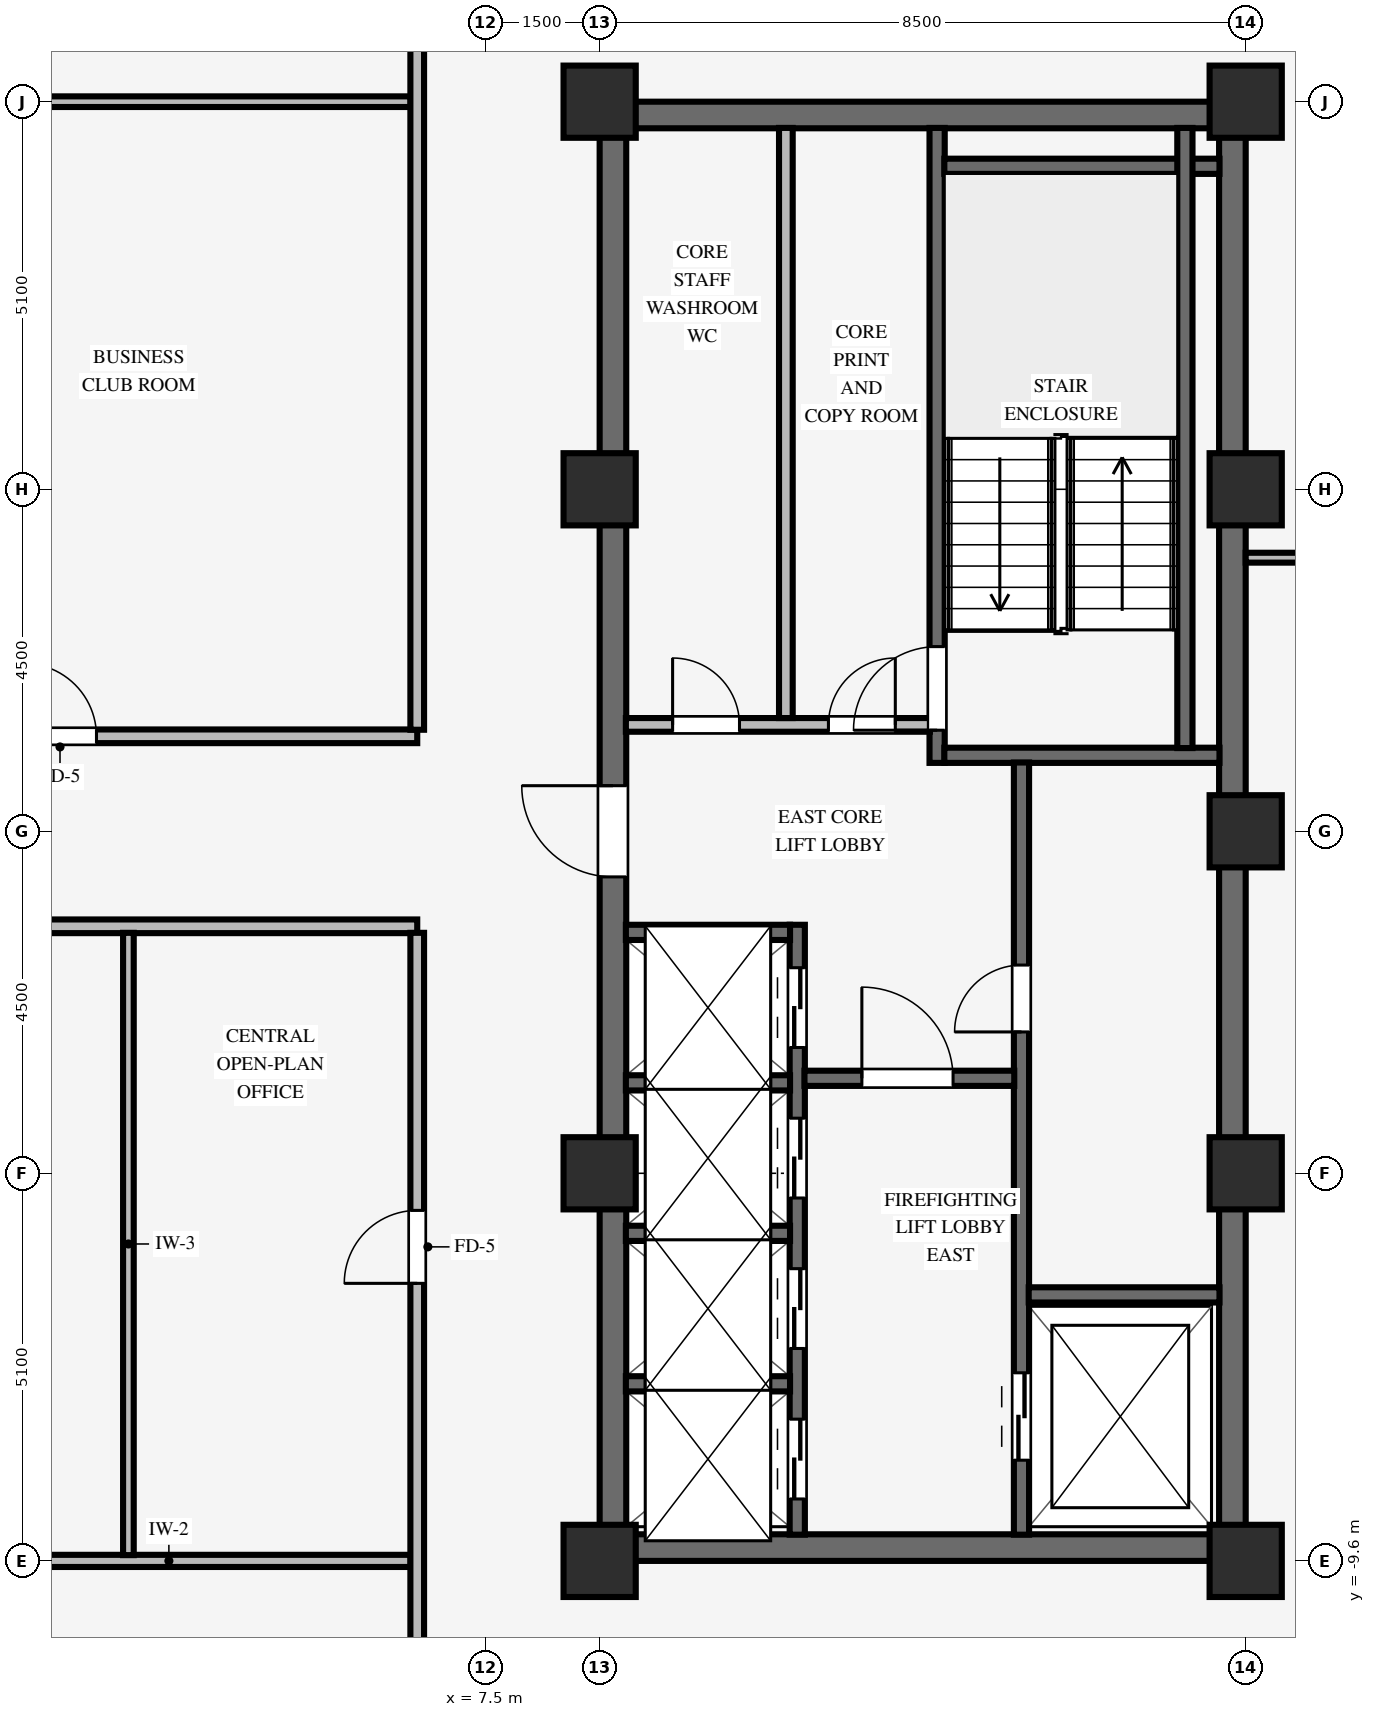
"""IFC4 building model, lengths in metres.
Left out: names, types, materials, properties, quantities, classifications, styles, units other than length and angle.
Written with IfcOpenShell. Run it as: python <this file> out.ifc"""

import sys

from ifc_helpers import new_model, si_unit, direction, frame, frame_2d, origin, origin_2d, place, context, subcontext, project, spatial, rectangle, extrude, source, transform, mapped, element, fill, save


model = new_model("IFC4")
c1 = context("Model", 3, precision=1e-05, world=origin(), true_north=direction((0.0, 1.0)))
c2 = subcontext(c1, "Body", "Model", "MODEL_VIEW")
j1 = project(units=[si_unit("LENGTHUNIT", "METRE"), si_unit("PLANEANGLEUNIT", "RADIAN")], contexts=[c1])
p1 = place(None, origin())
s1 = spatial("IfcSite", under=j1, at=p1, CompositionType="ELEMENT")
p2 = place(p1, origin())
s2 = spatial("IfcBuilding", under=s1, at=p2, CompositionType="ELEMENT")
p3 = place(p2, frame((0.0, 0.0, 198.2)))
s3 = spatial("IfcBuildingStorey", under=s2, at=p3, CompositionType="ELEMENT", Elevation=198.2)
for number, where, z_axis, x_axis in (
    (1, (9.0, -9.425, 0.0), (0.0, 0.0, 1.0), (1.0, 0.0, 0.0)),
    (2, (9.0, 9.425, 0.0), (0.0, 0.0, 1.0), (1.0, 0.0, 0.0)),
):
    element("IfcWall", number, at=place(p3, frame(where, z_axis=z_axis, x_axis=x_axis)), inside=s3, PredefinedType="SHEAR", context=c2, shape_type="SweptSolid", body=[
        extrude(rectangle(XDim=8.5, YDim=0.35, at=frame_2d((4.25, 0.0))), origin(), (0.0, 0.0, 1.0), 3.37),
    ])
p4 = place(p3, frame((9.175, -9.255, 0.0), z_axis=(0.0, 0.0, 1.0), x_axis=(0.0, 1.0, 0.0)))
e3 = element("IfcWall", 3, at=p4, inside=s3, PredefinedType="SHEAR", context=c2, shape_type="SweptSolid", body=[
    extrude(rectangle(XDim=18.51, YDim=0.35, at=frame_2d((9.255, 0.0))), origin(), (0.0, 0.0, 1.0), 3.37),
])
p5 = place(p4, frame((8.655, 0.0, 0.0)))
e4 = element("IfcOpeningElement", 4, at=p5, cuts=e3, PredefinedType="OPENING", context=c2, shape_type="SweptSolid", body=[
    extrude(rectangle(XDim=1.2, YDim=2.15, at=frame_2d((0.6, 1.075))), frame((0.0, 0.185, 0.0), z_axis=(0.0, -1.0, 0.0), x_axis=(1.0, 0.0, 0.0)), (0.0, 0.0, 1.0), 0.37),
])
p6 = place(p3, frame((17.325, -9.255, 0.0), z_axis=(0.0, 0.0, 1.0), x_axis=(0.0, 1.0, 0.0)))
e5 = element("IfcWall", 5, at=p6, inside=s3, PredefinedType="SHEAR", context=c2, shape_type="SweptSolid", body=[
    extrude(rectangle(XDim=18.51, YDim=0.35, at=frame_2d((9.255, 0.0))), origin(), (0.0, 0.0, 1.0), 3.37),
])
for number, where, z_axis, x_axis in (
    (6, (9.0, -9.6, 0.0), (0.0, 0.0, 1.0), (1.0, 0.0, 0.0)),
    (7, (9.0, -4.5, 0.0), (0.0, 0.0, 1.0), (1.0, 0.0, 0.0)),
    (8, (9.0, 4.5, 0.0), (0.0, 0.0, 1.0), (1.0, 0.0, 0.0)),
    (9, (9.0, 9.6, 0.0), (0.0, 0.0, 1.0), (1.0, 0.0, 0.0)),
    (10, (17.5, -9.6, 0.0), (0.0, 0.0, 1.0), (1.0, 0.0, 0.0)),
    (11, (17.5, -4.5, 0.0), (0.0, 0.0, 1.0), (1.0, 0.0, 0.0)),
    (12, (17.5, 4.5, 0.0), (0.0, 0.0, 1.0), (1.0, 0.0, 0.0)),
    (13, (17.5, 9.6, 0.0), (0.0, 0.0, 1.0), (1.0, 0.0, 0.0)),
    (14, (17.5, 0.0, 0.0), (0.0, 0.0, 1.0), (1.0, 0.0, 0.0)),
):
    element("IfcColumn", number, at=place(p3, frame(where, z_axis=z_axis, x_axis=x_axis)), inside=s3, PredefinedType="COLUMN", context=c2, shape_type="SweptSolid", body=[
        extrude(rectangle(XDim=0.95, YDim=0.95, at=origin_2d()), origin(), (0.0, 0.0, 1.0), 3.37),
    ])
p7 = place(p3, frame((13.44, 0.9, 0.0), z_axis=(0.0, 0.0, 1.0), x_axis=(0.0, 1.0, 0.0)))
e15 = element("IfcWall", 15, at=p7, inside=s3, PredefinedType="SHEAR", context=c2, shape_type="SweptSolid", body=[
    extrude(rectangle(XDim=8.355, YDim=0.2, at=frame_2d((4.177, 0.0))), origin(), (0.0, 0.0, 1.0), 3.37),
])
p8 = place(p7, frame((0.43, 0.0, 0.0)))
e16 = element("IfcOpeningElement", 16, at=p8, cuts=e15, PredefinedType="OPENING", context=c2, shape_type="SweptSolid", body=[
    extrude(rectangle(XDim=1.1, YDim=2.15, at=frame_2d((0.55, 1.075))), frame((0.0, 0.11, 0.0), z_axis=(0.0, -1.0, 0.0), x_axis=(1.0, 0.0, 0.0)), (0.0, 0.0, 1.0), 0.22),
])
for number, where, z_axis, x_axis in (
    (17, (13.535, 1.0, 0.0), (0.0, 0.0, 1.0), (1.0, 0.0, 0.0)),
    (18, (13.535, 8.75, 0.0), (0.0, 0.0, 1.0), (1.0, 0.0, 0.0)),
):
    element("IfcWall", number, at=place(p3, frame(where, z_axis=z_axis, x_axis=x_axis)), inside=s3, PredefinedType="SHEAR", context=c2, shape_type="SweptSolid", body=[
        extrude(rectangle(XDim=3.62, YDim=0.2, at=frame_2d((1.81, 0.0))), origin(), (0.0, 0.0, 1.0), 3.37),
    ])
p9 = place(p3, frame((16.7, 1.095, 0.0), z_axis=(0.0, 0.0, 1.0), x_axis=(0.0, 1.0, 0.0)))
e19 = element("IfcWall", 19, at=p9, inside=s3, PredefinedType="SHEAR", context=c2, shape_type="SweptSolid", body=[
    extrude(rectangle(XDim=8.16, YDim=0.2, at=frame_2d((4.08, 0.0))), origin(), (0.0, 0.0, 1.0), 3.37),
])
p10 = place(p3, frame((14.55, -9.255, 0.0), z_axis=(0.0, 0.0, 1.0), x_axis=(0.0, 1.0, 0.0)))
e20 = element("IfcWall", 20, at=p10, inside=s3, PredefinedType="SHEAR", context=c2, shape_type="SweptSolid", body=[
    extrude(rectangle(XDim=10.16, YDim=0.2, at=frame_2d((5.08, 0.0))), origin(), (0.0, 0.0, 1.0), 3.37),
])
p11 = place(p10, frame((6.615, 0.0, 0.0)))
e21 = element("IfcOpeningElement", 21, at=p11, cuts=e20, PredefinedType="OPENING", context=c2, shape_type="SweptSolid", body=[
    extrude(rectangle(XDim=0.88, YDim=2.1, at=frame_2d((0.44, 1.05))), frame((0.0, 0.11, 0.0), z_axis=(0.0, -1.0, 0.0), x_axis=(1.0, 0.0, 0.0)), (0.0, 0.0, 1.0), 0.22),
])
p12 = place(p10, frame((0.98, 0.0, 0.0)))
e22 = element("IfcOpeningElement", 22, at=p12, cuts=e20, PredefinedType="OPENING", context=c2, shape_type="SweptSolid", body=[
    extrude(rectangle(XDim=1.15, YDim=2.15, at=frame_2d((0.575, 1.075))), frame((0.0, 0.11, 0.0), z_axis=(0.0, -1.0, 0.0), x_axis=(1.0, 0.0, 0.0)), (0.0, 0.0, 1.0), 0.22),
])
p13 = place(p3, frame((14.645, -6.1, 0.0), z_axis=(0.0, 0.0, 1.0), x_axis=(1.0, 0.0, 0.0)))
e23 = element("IfcWall", 23, at=p13, inside=s3, PredefinedType="SHEAR", context=c2, shape_type="SweptSolid", body=[
    extrude(rectangle(XDim=2.51, YDim=0.2, at=frame_2d((1.255, 0.0))), origin(), (0.0, 0.0, 1.0), 3.37),
])
p14 = place(p3, frame((11.6, -9.255, 0.0), z_axis=(0.0, 0.0, 1.0), x_axis=(0.0, 1.0, 0.0)))
e24 = element("IfcWall", 24, at=p14, inside=s3, PredefinedType="SHEAR", context=c2, shape_type="SweptSolid", body=[
    extrude(rectangle(XDim=8.025, YDim=0.2, at=frame_2d((4.012, 0.0))), origin(), (0.0, 0.0, 1.0), 3.37),
])
p15 = place(p14, frame((0.47, 0.0, 0.0)))
e25 = element("IfcOpeningElement", 25, at=p15, cuts=e24, PredefinedType="OPENING", context=c2, shape_type="SweptSolid", body=[
    extrude(rectangle(XDim=1.05, YDim=2.15, at=frame_2d((0.525, 1.075))), frame((0.0, 0.11, 0.0), z_axis=(0.0, -1.0, 0.0), x_axis=(1.0, 0.0, 0.0)), (0.0, 0.0, 1.0), 0.22),
])
p16 = place(p14, frame((2.45, 0.0, 0.0)))
e26 = element("IfcOpeningElement", 26, at=p16, cuts=e24, PredefinedType="OPENING", context=c2, shape_type="SweptSolid", body=[
    extrude(rectangle(XDim=1.05, YDim=2.15, at=frame_2d((0.525, 1.075))), frame((0.0, 0.11, 0.0), z_axis=(0.0, -1.0, 0.0), x_axis=(1.0, 0.0, 0.0)), (0.0, 0.0, 1.0), 0.22),
])
p17 = place(p14, frame((4.43, 0.0, 0.0)))
e27 = element("IfcOpeningElement", 27, at=p17, cuts=e24, PredefinedType="OPENING", context=c2, shape_type="SweptSolid", body=[
    extrude(rectangle(XDim=1.05, YDim=2.15, at=frame_2d((0.525, 1.075))), frame((0.0, 0.11, 0.0), z_axis=(0.0, -1.0, 0.0), x_axis=(1.0, 0.0, 0.0)), (0.0, 0.0, 1.0), 0.22),
])
p18 = place(p14, frame((6.41, 0.0, 0.0)))
e28 = element("IfcOpeningElement", 28, at=p18, cuts=e24, PredefinedType="OPENING", context=c2, shape_type="SweptSolid", body=[
    extrude(rectangle(XDim=1.05, YDim=2.15, at=frame_2d((0.525, 1.075))), frame((0.0, 0.11, 0.0), z_axis=(0.0, -1.0, 0.0), x_axis=(1.0, 0.0, 0.0)), (0.0, 0.0, 1.0), 0.22),
])
p19 = place(p3, frame((11.695, -3.25, 0.0), z_axis=(0.0, 0.0, 1.0), x_axis=(1.0, 0.0, 0.0)))
e29 = element("IfcWall", 29, at=p19, inside=s3, PredefinedType="SHEAR", context=c2, shape_type="SweptSolid", body=[
    extrude(rectangle(XDim=2.76, YDim=0.2, at=frame_2d((1.38, 0.0))), origin(), (0.0, 0.0, 1.0), 3.37),
])
p20 = place(p19, frame((0.755, 0.0, 0.0)))
e30 = element("IfcOpeningElement", 30, at=p20, cuts=e29, PredefinedType="OPENING", context=c2, shape_type="SweptSolid", body=[
    extrude(rectangle(XDim=1.2, YDim=2.15, at=frame_2d((0.6, 1.075))), frame((0.0, 0.11, 0.0), z_axis=(0.0, -1.0, 0.0), x_axis=(1.0, 0.0, 0.0)), (0.0, 0.0, 1.0), 0.22),
])
for number, where, z_axis, x_axis in (
    (31, (9.345, -7.27, 0.0), (0.0, 0.0, 1.0), (1.0, 0.0, 0.0)),
    (32, (9.345, -5.29, 0.0), (0.0, 0.0, 1.0), (1.0, 0.0, 0.0)),
    (33, (9.345, -3.31, 0.0), (0.0, 0.0, 1.0), (1.0, 0.0, 0.0)),
    (34, (9.345, -1.33, 0.0), (0.0, 0.0, 1.0), (1.0, 0.0, 0.0)),
):
    element("IfcWall", number, at=place(p3, frame(where, z_axis=z_axis, x_axis=x_axis)), inside=s3, PredefinedType="SHEAR", context=c2, shape_type="SweptSolid", body=[
        extrude(rectangle(XDim=2.16, YDim=0.2, at=frame_2d((1.08, 0.0))), origin(), (0.0, 0.0, 1.0), 3.37),
    ])
p21 = place(p3, frame((9.345, 1.4, 0.0), z_axis=(0.0, 0.0, 1.0), x_axis=(1.0, 0.0, 0.0)))
e35 = element("IfcWall", 35, at=p21, inside=s3, PredefinedType="PARTITIONING", context=c2, shape_type="SweptSolid", body=[
    extrude(rectangle(XDim=4.0, YDim=0.18, at=frame_2d((2.0, 0.0))), origin(), (0.0, 0.0, 1.0), 3.36),
])
p22 = place(p21, frame((0.615, 0.0, 0.0)))
e36 = element("IfcOpeningElement", 36, at=p22, cuts=e35, PredefinedType="OPENING", context=c2, shape_type="SweptSolid", body=[
    extrude(rectangle(XDim=0.88, YDim=2.1, at=frame_2d((0.44, 1.05))), frame((0.0, 0.1, 0.0), z_axis=(0.0, -1.0, 0.0), x_axis=(1.0, 0.0, 0.0)), (0.0, 0.0, 1.0), 0.2),
])
p23 = place(p21, frame((2.665, 0.0, 0.0)))
e37 = element("IfcOpeningElement", 37, at=p23, cuts=e35, PredefinedType="OPENING", context=c2, shape_type="SweptSolid", body=[
    extrude(rectangle(XDim=0.88, YDim=2.1, at=frame_2d((0.44, 1.05))), frame((0.0, 0.1, 0.0), z_axis=(0.0, -1.0, 0.0), x_axis=(1.0, 0.0, 0.0)), (0.0, 0.0, 1.0), 0.2),
])
p24 = place(p3, frame((11.45, 1.49, 0.0), z_axis=(0.0, 0.0, 1.0), x_axis=(0.0, 1.0, 0.0)))
e38 = element("IfcWall", 38, at=p24, inside=s3, PredefinedType="PARTITIONING", context=c2, shape_type="SweptSolid", body=[
    extrude(rectangle(XDim=7.765, YDim=0.18, at=frame_2d((3.882, 0.0))), origin(), (0.0, 0.0, 1.0), 3.36),
])
p25 = place(p3, frame((0.151, -9.6, 0.0), z_axis=(0.0, 0.0, 1.0), x_axis=(1.0, 0.0, 0.0)))
e39 = element("IfcWall", 39, at=p25, inside=s3, PredefinedType="PARTITIONING", context=c2, shape_type="SweptSolid", body=[
    extrude(rectangle(XDim=6.363, YDim=0.16, at=frame_2d((3.182, 0.0))), origin(), (0.0, 0.0, 1.0), 2.405),
])
p26 = place(p3, frame((-9.0, -1.25, 0.0), z_axis=(0.0, 0.0, 1.0), x_axis=(1.0, 0.0, 0.0)))
e40 = element("IfcWall", 40, at=p26, inside=s3, PredefinedType="PARTITIONING", context=c2, shape_type="SweptSolid", body=[
    extrude(rectangle(XDim=15.6, YDim=0.18, at=frame_2d((7.8, 0.0))), origin(), (0.0, 0.0, 1.0), 3.36),
])
p27 = place(p26, frame((5.42, 0.0, 0.0)))
e41 = element("IfcOpeningElement", 41, at=p27, cuts=e40, PredefinedType="OPENING", context=c2, shape_type="SweptSolid", body=[
    extrude(rectangle(XDim=0.96, YDim=2.1, at=frame_2d((0.48, 1.05))), frame((0.0, 0.1, 0.0), z_axis=(0.0, -1.0, 0.0), x_axis=(1.0, 0.0, 0.0)), (0.0, 0.0, 1.0), 0.2),
])
p28 = place(p3, frame((-9.0, 1.25, 0.0), z_axis=(0.0, 0.0, 1.0), x_axis=(1.0, 0.0, 0.0)))
e42 = element("IfcWall", 42, at=p28, inside=s3, PredefinedType="PARTITIONING", context=c2, shape_type="SweptSolid", body=[
    extrude(rectangle(XDim=15.6, YDim=0.18, at=frame_2d((7.8, 0.0))), origin(), (0.0, 0.0, 1.0), 3.36),
])
p29 = place(p28, frame((10.42, 0.0, 0.0)))
e43 = element("IfcOpeningElement", 43, at=p29, cuts=e42, PredefinedType="OPENING", context=c2, shape_type="SweptSolid", body=[
    extrude(rectangle(XDim=0.96, YDim=2.1, at=frame_2d((0.48, 1.05))), frame((0.0, 0.1, 0.0), z_axis=(0.0, -1.0, 0.0), x_axis=(1.0, 0.0, 0.0)), (0.0, 0.0, 1.0), 0.2),
])
p30 = place(p28, frame((2.62, 0.0, 0.0)))
e44 = element("IfcOpeningElement", 44, at=p30, cuts=e42, PredefinedType="OPENING", context=c2, shape_type="SweptSolid", body=[
    extrude(rectangle(XDim=0.96, YDim=2.1, at=frame_2d((0.48, 1.05))), frame((0.0, 0.1, 0.0), z_axis=(0.0, -1.0, 0.0), x_axis=(1.0, 0.0, 0.0)), (0.0, 0.0, 1.0), 0.2),
])
p31 = place(p3, frame((17.5, 3.6, 0.0), z_axis=(0.0, 0.0, 1.0), x_axis=(1.0, 0.0, 0.0)))
e45 = element("IfcWall", 45, at=p31, inside=s3, PredefinedType="PARTITIONING", context=c2, shape_type="SweptSolid", body=[
    extrude(rectangle(XDim=4.79, YDim=0.13, at=frame_2d((2.395, 0.0))), origin(), (0.0, 0.0, 1.0), 3.36),
])
p32 = place(p3, frame((0.151, 9.6, 0.0), z_axis=(0.0, 0.0, 1.0), x_axis=(1.0, 0.0, 0.0)))
e46 = element("IfcWall", 46, at=p32, inside=s3, PredefinedType="PARTITIONING", context=c2, shape_type="SweptSolid", body=[
    extrude(rectangle(XDim=6.363, YDim=0.14, at=frame_2d((3.182, 0.0))), origin(), (0.0, 0.0, 1.0), 2.405),
])
p33 = place(p3, frame((2.8, -9.524, 0.0), z_axis=(0.0, 0.0, 1.0), x_axis=(0.0, 1.0, 0.0)))
e47 = element("IfcWall", 47, at=p33, inside=s3, PredefinedType="PARTITIONING", context=c2, shape_type="SweptSolid", body=[
    extrude(rectangle(XDim=8.188, YDim=0.14, at=frame_2d((4.094, 0.0))), origin(), (0.0, 0.0, 1.0), 3.36),
])
p34 = place(p3, frame((6.6, -13.414, 0.0), z_axis=(0.0, 0.0, 1.0), x_axis=(0.0, 1.0, 0.0)))
e48 = element("IfcWall", 48, at=p34, inside=s3, PredefinedType="PARTITIONING", context=c2, shape_type="SweptSolid", body=[
    extrude(rectangle(XDim=12.078, YDim=0.18, at=frame_2d((6.039, 0.0))), origin(), (0.0, 0.0, 1.0), 3.36),
])
p35 = place(p34, frame((7.466, 0.0, 0.0)))
e49 = element("IfcOpeningElement", 49, at=p35, cuts=e48, PredefinedType="OPENING", context=c2, shape_type="SweptSolid", body=[
    extrude(rectangle(XDim=0.96, YDim=2.1, at=frame_2d((0.48, 1.05))), frame((0.0, 0.1, 0.0), z_axis=(0.0, -1.0, 0.0), x_axis=(1.0, 0.0, 0.0)), (0.0, 0.0, 1.0), 0.2),
])
p36 = place(p3, frame((6.6, 1.336, 0.0), z_axis=(0.0, 0.0, 1.0), x_axis=(0.0, 1.0, 0.0)))
e50 = element("IfcWall", 50, at=p36, inside=s3, PredefinedType="PARTITIONING", context=c2, shape_type="SweptSolid", body=[
    extrude(rectangle(XDim=12.078, YDim=0.18, at=frame_2d((6.039, 0.0))), origin(), (0.0, 0.0, 1.0), 3.36),
])
m1 = source(origin(), c2, "Body", "SweptSolid", [
    extrude(rectangle(XDim=1.1, YDim=2.15, at=frame_2d((0.55, 1.075))), frame((0.0, 0.025, 0.0), z_axis=(0.0, -1.0, 0.0), x_axis=(1.0, 0.0, 0.0)), (0.0, 0.0, 1.0), 0.05),
])
p37 = place(p8, origin())
e51 = element("IfcDoor", 51, at=p37, inside=s3, OperationType="SINGLE_SWING_LEFT", PredefinedType="DOOR", context=c2, shape_type="MappedRepresentation", body=[
    mapped(m1, transform((0.0, 0.0, 0.0), scale=1.0)),
])
fill(e16, e51)
m2 = source(origin(), c2, "Body", "SweptSolid", [
    extrude(rectangle(XDim=0.88, YDim=2.1, at=frame_2d((0.44, 1.05))), frame((0.0, 0.025, 0.0), z_axis=(0.0, -1.0, 0.0), x_axis=(1.0, 0.0, 0.0)), (0.0, 0.0, 1.0), 0.05),
])
p38 = place(p11, origin())
e52 = element("IfcDoor", 52, at=p38, inside=s3, OperationType="SINGLE_SWING_LEFT", PredefinedType="DOOR", context=c2, shape_type="MappedRepresentation", body=[
    mapped(m2, transform((0.0, 0.0, 0.0), scale=1.0)),
])
fill(e21, e52)
m3 = source(origin(), c2, "Body", "SweptSolid", [
    extrude(rectangle(XDim=1.2, YDim=2.15, at=frame_2d((0.6, 1.075))), frame((0.0, 0.025, 0.0), z_axis=(0.0, -1.0, 0.0), x_axis=(1.0, 0.0, 0.0)), (0.0, 0.0, 1.0), 0.05),
])
p39 = place(p20, origin())
e53 = element("IfcDoor", 53, at=p39, inside=s3, OperationType="SINGLE_SWING_LEFT", PredefinedType="DOOR", context=c2, shape_type="MappedRepresentation", body=[
    mapped(m3, transform((0.0, 0.0, 0.0), scale=1.0)),
])
fill(e30, e53)
p40 = place(p5, origin())
e54 = element("IfcDoor", 54, at=p40, inside=s3, OperationType="SINGLE_SWING_RIGHT", PredefinedType="DOOR", context=c2, shape_type="MappedRepresentation", body=[
    mapped(m3, transform((0.0, 0.0, 0.0), scale=1.0)),
])
fill(e4, e54)
p41 = place(p22, origin())
e55 = element("IfcDoor", 55, at=p41, inside=s3, OperationType="SINGLE_SWING_LEFT", PredefinedType="DOOR", context=c2, shape_type="MappedRepresentation", body=[
    mapped(m2, transform((0.0, 0.0, 0.0), scale=1.0)),
])
fill(e36, e55)
p42 = place(p23, origin())
e56 = element("IfcDoor", 56, at=p42, inside=s3, OperationType="SINGLE_SWING_RIGHT", PredefinedType="DOOR", context=c2, shape_type="MappedRepresentation", body=[
    mapped(m2, transform((0.0, 0.0, 0.0), scale=1.0)),
])
fill(e37, e56)
m4 = source(origin(), c2, "Body", "SweptSolid", [
    extrude(rectangle(XDim=1.15, YDim=2.15, at=frame_2d((0.575, 1.075))), frame((0.0, 0.025, 0.0), z_axis=(0.0, -1.0, 0.0), x_axis=(1.0, 0.0, 0.0)), (0.0, 0.0, 1.0), 0.05),
])
p43 = place(p12, origin())
e57 = element("IfcDoor", 57, at=p43, inside=s3, OperationType="DOUBLE_DOOR_SLIDING", PredefinedType="DOOR", context=c2, shape_type="MappedRepresentation", body=[
    mapped(m4, transform((0.0, 0.0, 0.0), scale=1.0)),
])
fill(e22, e57)
m5 = source(origin(), c2, "Body", "SweptSolid", [
    extrude(rectangle(XDim=1.05, YDim=2.15, at=frame_2d((0.525, 1.075))), frame((0.0, 0.025, 0.0), z_axis=(0.0, -1.0, 0.0), x_axis=(1.0, 0.0, 0.0)), (0.0, 0.0, 1.0), 0.05),
])
p44 = place(p15, origin())
e58 = element("IfcDoor", 58, at=p44, inside=s3, OperationType="DOUBLE_DOOR_SLIDING", PredefinedType="DOOR", context=c2, shape_type="MappedRepresentation", body=[
    mapped(m5, transform((0.0, 0.0, 0.0), scale=1.0)),
])
fill(e25, e58)
p45 = place(p16, origin())
e59 = element("IfcDoor", 59, at=p45, inside=s3, OperationType="DOUBLE_DOOR_SLIDING", PredefinedType="DOOR", context=c2, shape_type="MappedRepresentation", body=[
    mapped(m5, transform((0.0, 0.0, 0.0), scale=1.0)),
])
fill(e26, e59)
p46 = place(p17, origin())
e60 = element("IfcDoor", 60, at=p46, inside=s3, OperationType="DOUBLE_DOOR_SLIDING", PredefinedType="DOOR", context=c2, shape_type="MappedRepresentation", body=[
    mapped(m5, transform((0.0, 0.0, 0.0), scale=1.0)),
])
fill(e27, e60)
p47 = place(p18, origin())
e61 = element("IfcDoor", 61, at=p47, inside=s3, OperationType="DOUBLE_DOOR_SLIDING", PredefinedType="DOOR", context=c2, shape_type="MappedRepresentation", body=[
    mapped(m5, transform((0.0, 0.0, 0.0), scale=1.0)),
])
fill(e28, e61)
m6 = source(origin(), c2, "Body", "SweptSolid", [
    extrude(rectangle(XDim=0.96, YDim=2.1, at=frame_2d((0.48, 1.05))), frame((0.0, 0.025, 0.0), z_axis=(0.0, -1.0, 0.0), x_axis=(1.0, 0.0, 0.0)), (0.0, 0.0, 1.0), 0.05),
])
p48 = place(p29, origin())
e62 = element("IfcDoor", 62, at=p48, inside=s3, OperationType="SINGLE_SWING_LEFT", PredefinedType="DOOR", context=c2, shape_type="MappedRepresentation", body=[
    mapped(m6, transform((0.0, 0.0, 0.0), scale=1.0)),
])
fill(e43, e62)
p49 = place(p35, origin())
e63 = element("IfcDoor", 63, at=p49, inside=s3, OperationType="SINGLE_SWING_LEFT", PredefinedType="DOOR", context=c2, shape_type="MappedRepresentation", body=[
    mapped(m6, transform((0.0, 0.0, 0.0), scale=1.0)),
])
fill(e49, e63)
save(model, sys.argv[1])
